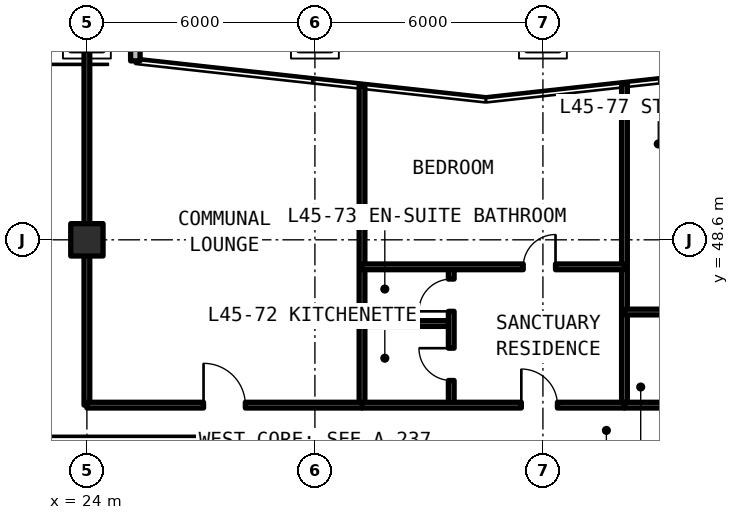
"""IFC4 building model, lengths in metres.
Left out: names, types, materials, properties, quantities, classifications, styles, units other than length and angle.
Written with IfcOpenShell. Run it as: python <this file> out.ifc"""

import sys

from ifc_helpers import new_model, si_unit, direction, frame, frame_2d, origin, origin_2d, place, context, subcontext, project, spatial, rectangle, extrude, element, fill, save


model = new_model("IFC4")
c1 = context("Model", 3, precision=1e-05, world=origin(), true_north=direction((0.0, 1.0)))
c2 = subcontext(c1, "Body", "Model", "MODEL_VIEW")
j1 = project(units=[si_unit("LENGTHUNIT", "METRE"), si_unit("PLANEANGLEUNIT", "RADIAN")], contexts=[c1])
p1 = place(None, origin())
s1 = spatial("IfcSite", under=j1, at=p1, CompositionType="ELEMENT")
p2 = place(p1, origin())
s2 = spatial("IfcBuilding", under=s1, at=p2, CompositionType="ELEMENT")
p3 = place(p2, frame((0.0, 0.0, 162.03)))
s3 = spatial("IfcBuildingStorey", under=s2, at=p3, CompositionType="ELEMENT", Elevation=162.03)
p4 = place(p3, frame((24.0, 48.6, 0.0), z_axis=(0.0, 0.0, 1.0), x_axis=(1.0, 0.0, 0.0)))
e1 = element("IfcColumn", 1, at=p4, inside=s3, PredefinedType="COLUMN", context=c2, shape_type="SweptSolid", body=[
    extrude(rectangle(XDim=0.85, YDim=0.85, at=origin_2d()), origin(), (0.0, 0.0, 1.0), 3.63),
])
p5 = place(p3, frame((25.275, 53.308, 0.0), z_axis=(0.0, 0.0, 1.0), x_axis=(0.0, 1.0, 0.0)))
e2 = element("IfcWall", 2, at=p5, inside=s3, PredefinedType="SOLIDWALL", context=c2, shape_type="SweptSolid", body=[
    extrude(rectangle(XDim=1.867, YDim=0.25, at=frame_2d((0.934, 0.0))), origin(), (0.0, 0.0, 1.0), 3.41),
])
p6 = place(p3, frame((23.852, 55.175, 0.0), z_axis=(0.0, 0.0, 1.0), x_axis=(-0.70708586489, -0.707127696864, 0.0)))
e3 = element("IfcWall", 3, at=p6, inside=s3, PredefinedType="SOLIDWALL", context=c2, shape_type="SweptSolid", body=[
    extrude(rectangle(XDim=5.836, YDim=0.25, at=frame_2d((2.918, 0.0))), origin(), (0.0, 0.0, 1.0), 3.41),
])
p7 = place(p6, frame((1.538, 0.0, 0.78)))
e4 = element("IfcOpeningElement", 4, at=p7, cuts=e3, PredefinedType="OPENING", context=c2, shape_type="SweptSolid", body=[
    extrude(rectangle(XDim=3.4, YDim=1.66, at=frame_2d((1.7, 0.83))), frame((0.0, 0.135, 0.0), z_axis=(0.0, -1.0, 0.0), x_axis=(1.0, 0.0, 0.0)), (0.0, 0.0, 1.0), 0.27),
])
p8 = place(p3, frame((24.0, 44.25, 0.0), z_axis=(0.0, 0.0, 1.0), x_axis=(0.0, 1.0, 0.0)))
e5 = element("IfcWall", 5, at=p8, inside=s3, PredefinedType="SOLIDWALL", context=c2, shape_type="SweptSolid", body=[
    extrude(rectangle(XDim=10.925, YDim=0.15, at=frame_2d((5.462, 0.0))), origin(), (0.0, 0.0, 1.0), 2.63),
])
p9 = place(p3, frame((31.24, 44.25, 0.0), z_axis=(0.0, 0.0, 1.0), x_axis=(0.0, 1.0, 0.0)))
e6 = element("IfcWall", 6, at=p9, inside=s3, PredefinedType="SOLIDWALL", context=c2, shape_type="SweptSolid", body=[
    extrude(rectangle(XDim=8.403, YDim=0.15, at=frame_2d((4.201, 0.0))), origin(), (0.0, 0.0, 1.0), 2.63),
])
p10 = place(p3, frame((24.0, 44.25, 0.0), z_axis=(0.0, 0.0, 1.0), x_axis=(1.0, 0.0, 0.0)))
e7 = element("IfcWall", 7, at=p10, inside=s3, PredefinedType="SOLIDWALL", context=c2, shape_type="SweptSolid", body=[
    extrude(rectangle(XDim=7.24, YDim=0.15, at=frame_2d((3.62, 0.0))), origin(), (0.0, 0.0, 1.0), 2.63),
])
p11 = place(p10, frame((3.07, 0.0, 0.0)))
e8 = element("IfcOpeningElement", 8, at=p11, cuts=e7, PredefinedType="OPENING", context=c2, shape_type="SweptSolid", body=[
    extrude(rectangle(XDim=1.1, YDim=2.15, at=frame_2d((0.55, 1.075))), frame((0.0, 0.085, 0.0), z_axis=(0.0, -1.0, 0.0), x_axis=(1.0, 0.0, 0.0)), (0.0, 0.0, 1.0), 0.17),
])
p12 = place(p3, frame((38.146, 44.25, 0.0), z_axis=(0.0, 0.0, 1.0), x_axis=(0.0, 1.0, 0.0)))
e9 = element("IfcWall", 9, at=p12, inside=s3, PredefinedType="SOLIDWALL", context=c2, shape_type="SweptSolid", body=[
    extrude(rectangle(XDim=8.445, YDim=0.15, at=frame_2d((4.222, 0.0))), origin(), (0.0, 0.0, 1.0), 2.63),
])
p13 = place(p3, frame((31.24, 46.397, 0.0), z_axis=(0.0, 0.0, 1.0), x_axis=(1.0, 0.0, 0.0)))
e10 = element("IfcWall", 10, at=p13, inside=s3, PredefinedType="PARTITIONING", context=c2, shape_type="SweptSolid", body=[
    extrude(rectangle(XDim=2.348, YDim=0.15, at=frame_2d((1.174, 0.0))), origin(), (0.0, 0.0, 1.0), 2.63),
])
p14 = place(p3, frame((33.588, 44.25, 0.0), z_axis=(0.0, 0.0, 1.0), x_axis=(0.0, 1.0, 0.0)))
e11 = element("IfcWall", 11, at=p14, inside=s3, PredefinedType="PARTITIONING", context=c2, shape_type="SweptSolid", body=[
    extrude(rectangle(XDim=3.639, YDim=0.15, at=frame_2d((1.819, 0.0))), origin(), (0.0, 0.0, 1.0), 2.63),
])
p15 = place(p14, frame((0.648, 0.0, 0.0)))
e12 = element("IfcOpeningElement", 12, at=p15, cuts=e11, PredefinedType="OPENING", context=c2, shape_type="SweptSolid", body=[
    extrude(rectangle(XDim=0.85, YDim=2.1, at=frame_2d((0.425, 1.05))), frame((0.0, 0.085, 0.0), z_axis=(0.0, -1.0, 0.0), x_axis=(1.0, 0.0, 0.0)), (0.0, 0.0, 1.0), 0.17),
])
p16 = place(p14, frame((2.468, 0.0, 0.0)))
e13 = element("IfcOpeningElement", 13, at=p16, cuts=e11, PredefinedType="OPENING", context=c2, shape_type="SweptSolid", body=[
    extrude(rectangle(XDim=0.85, YDim=2.1, at=frame_2d((0.425, 1.05))), frame((0.0, 0.085, 0.0), z_axis=(0.0, -1.0, 0.0), x_axis=(1.0, 0.0, 0.0)), (0.0, 0.0, 1.0), 0.17),
])
p17 = place(p3, frame((31.24, 47.889, 0.0), z_axis=(0.0, 0.0, 1.0), x_axis=(1.0, 0.0, 0.0)))
e14 = element("IfcWall", 14, at=p17, inside=s3, PredefinedType="PARTITIONING", context=c2, shape_type="SweptSolid", body=[
    extrude(rectangle(XDim=6.906, YDim=0.15, at=frame_2d((3.453, 0.0))), origin(), (0.0, 0.0, 1.0), 2.63),
])
p18 = place(p17, frame((4.242, 0.0, 0.0)))
e15 = element("IfcOpeningElement", 15, at=p18, cuts=e14, PredefinedType="OPENING", context=c2, shape_type="SweptSolid", body=[
    extrude(rectangle(XDim=0.85, YDim=2.1, at=frame_2d((0.425, 1.05))), frame((0.0, 0.085, 0.0), z_axis=(0.0, -1.0, 0.0), x_axis=(1.0, 0.0, 0.0)), (0.0, 0.0, 1.0), 0.17),
])
p19 = place(p3, frame((31.24, 44.25, 0.0), z_axis=(0.0, 0.0, 1.0), x_axis=(1.0, 0.0, 0.0)))
e16 = element("IfcWall", 16, at=p19, inside=s3, PredefinedType="SOLIDWALL", context=c2, shape_type="SweptSolid", body=[
    extrude(rectangle(XDim=6.906, YDim=0.15, at=frame_2d((3.453, 0.0))), origin(), (0.0, 0.0, 1.0), 2.63),
])
p20 = place(p19, frame((4.192, 0.0, 0.0)))
e17 = element("IfcOpeningElement", 17, at=p20, cuts=e16, PredefinedType="OPENING", context=c2, shape_type="SweptSolid", body=[
    extrude(rectangle(XDim=0.95, YDim=2.15, at=frame_2d((0.475, 1.075))), frame((0.0, 0.085, 0.0), z_axis=(0.0, -1.0, 0.0), x_axis=(1.0, 0.0, 0.0)), (0.0, 0.0, 1.0), 0.17),
])
p21 = place(p3, frame((38.146, 46.7, 0.0), z_axis=(0.0, 0.0, 1.0), x_axis=(1.0, 0.0, 0.0)))
e18 = element("IfcWall", 18, at=p21, inside=s3, PredefinedType="PARTITIONING", context=c2, shape_type="SweptSolid", body=[
    extrude(rectangle(XDim=1.85, YDim=0.15, at=frame_2d((0.925, 0.0))), origin(), (0.0, 0.0, 1.0), 2.63),
])
p22 = place(p3, frame((38.146, 44.25, 0.0), z_axis=(0.0, 0.0, 1.0), x_axis=(1.0, 0.0, 0.0)))
e19 = element("IfcWall", 19, at=p22, inside=s3, PredefinedType="SOLIDWALL", context=c2, shape_type="SweptSolid", body=[
    extrude(rectangle(XDim=5.334, YDim=0.15, at=frame_2d((2.667, 0.0))), origin(), (0.0, 0.0, 1.0), 2.63),
])
p23 = place(p22, frame((2.437, 0.0, 0.0)))
e20 = element("IfcOpeningElement", 20, at=p23, cuts=e19, PredefinedType="OPENING", context=c2, shape_type="SweptSolid", body=[
    extrude(rectangle(XDim=0.95, YDim=2.15, at=frame_2d((0.475, 1.075))), frame((0.0, 0.085, 0.0), z_axis=(0.0, -1.0, 0.0), x_axis=(1.0, 0.0, 0.0)), (0.0, 0.0, 1.0), 0.17),
])
p24 = place(p11, origin())
e21 = element("IfcDoor", 21, at=p24, inside=s3, OperationType="SINGLE_SWING_LEFT", PredefinedType="DOOR", context=c2, shape_type="SweptSolid", body=[
    extrude(rectangle(XDim=1.1, YDim=2.15, at=frame_2d((0.55, 1.075))), frame((0.0, 0.025, 0.0), z_axis=(0.0, -1.0, 0.0), x_axis=(1.0, 0.0, 0.0)), (0.0, 0.0, 1.0), 0.05),
])
fill(e8, e21)
p25 = place(p15, origin())
e22 = element("IfcDoor", 22, at=p25, inside=s3, OperationType="SINGLE_SWING_RIGHT", PredefinedType="DOOR", context=c2, shape_type="SweptSolid", body=[
    extrude(rectangle(XDim=0.85, YDim=2.1, at=frame_2d((0.425, 1.05))), frame((0.0, 0.025, 0.0), z_axis=(0.0, -1.0, 0.0), x_axis=(1.0, 0.0, 0.0)), (0.0, 0.0, 1.0), 0.05),
])
fill(e12, e22)
p26 = place(p16, origin())
e23 = element("IfcDoor", 23, at=p26, inside=s3, OperationType="SINGLE_SWING_LEFT", PredefinedType="DOOR", context=c2, shape_type="SweptSolid", body=[
    extrude(rectangle(XDim=0.85, YDim=2.1, at=frame_2d((0.425, 1.05))), frame((0.0, 0.025, 0.0), z_axis=(0.0, -1.0, 0.0), x_axis=(1.0, 0.0, 0.0)), (0.0, 0.0, 1.0), 0.05),
])
fill(e13, e23)
p27 = place(p18, origin())
e24 = element("IfcDoor", 24, at=p27, inside=s3, OperationType="SINGLE_SWING_RIGHT", PredefinedType="DOOR", context=c2, shape_type="SweptSolid", body=[
    extrude(rectangle(XDim=0.85, YDim=2.1, at=frame_2d((0.425, 1.05))), frame((0.0, 0.025, 0.0), z_axis=(0.0, -1.0, 0.0), x_axis=(1.0, 0.0, 0.0)), (0.0, 0.0, 1.0), 0.05),
])
fill(e15, e24)
p28 = place(p20, origin())
e25 = element("IfcDoor", 25, at=p28, inside=s3, OperationType="SINGLE_SWING_LEFT", PredefinedType="DOOR", context=c2, shape_type="SweptSolid", body=[
    extrude(rectangle(XDim=0.95, YDim=2.15, at=frame_2d((0.475, 1.075))), frame((0.0, 0.025, 0.0), z_axis=(0.0, -1.0, 0.0), x_axis=(1.0, 0.0, 0.0)), (0.0, 0.0, 1.0), 0.05),
])
fill(e17, e25)
save(model, sys.argv[1])
